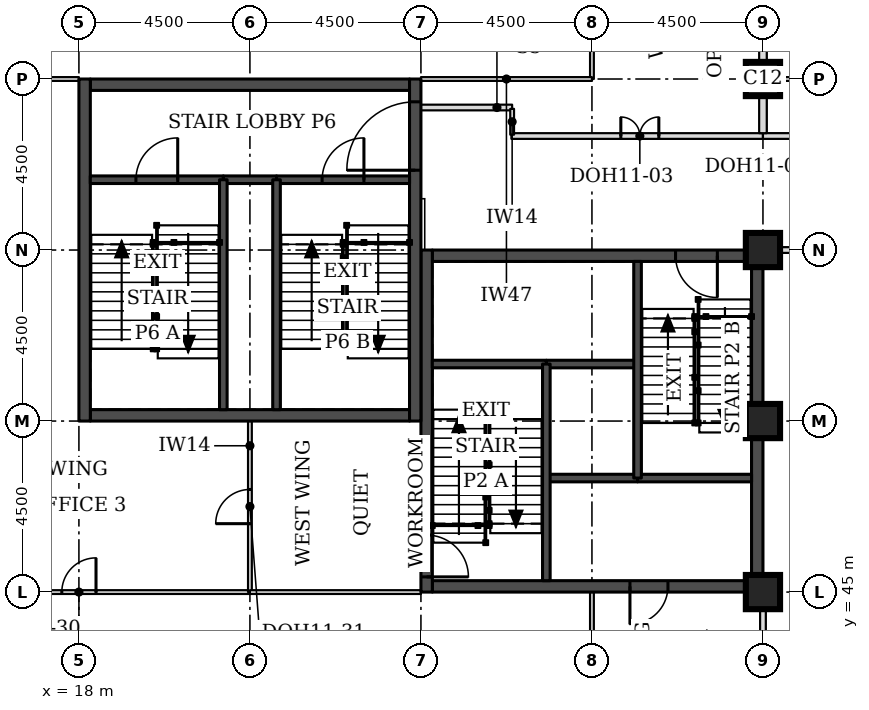
"""IFC4 building model, lengths in metres.
Left out: names, types, materials, properties, quantities, classifications, styles, units other than length and angle.
Written with IfcOpenShell. Run it as: python <this file> out.ifc"""

import sys

from ifc_helpers import new_model, si_unit, direction, frame, frame_2d, origin, origin_2d, place, context, subcontext, project, spatial, rectangle, extrude, element, fill, save


model = new_model("IFC4")
c1 = context("Model", 3, precision=1e-05, world=origin(), true_north=direction((0.0, 1.0)))
c2 = subcontext(c1, "Body", "Model", "MODEL_VIEW")
j1 = project(units=[si_unit("LENGTHUNIT", "METRE"), si_unit("PLANEANGLEUNIT", "RADIAN")], contexts=[c1])
p1 = place(None, origin())
s1 = spatial("IfcSite", under=j1, at=p1, CompositionType="ELEMENT")
p2 = place(p1, origin())
s2 = spatial("IfcBuilding", under=s1, at=p2, CompositionType="ELEMENT")
p3 = place(p2, frame((0.0, 0.0, 234.1)))
s3 = spatial("IfcBuildingStorey", under=s2, at=p3, CompositionType="ELEMENT", Elevation=234.1)
for number, where, z_axis, x_axis in (
    (1, (36.0, 45.0, 0.0), (0.0, 0.0, 1.0), (1.0, 0.0, 0.0)),
    (2, (36.0, 49.5, 0.0), (0.0, 0.0, 1.0), (1.0, 0.0, 0.0)),
    (3, (36.0, 54.0, 0.0), (0.0, 0.0, 1.0), (1.0, 0.0, 0.0)),
    (4, (36.0, 58.5, 0.0), (0.0, 0.0, 1.0), (1.0, 0.0, 0.0)),
):
    element("IfcColumn", number, at=place(p3, frame(where, z_axis=z_axis, x_axis=x_axis)), inside=s3, PredefinedType="COLUMN", context=c2, shape_type="SweptSolid", body=[
        extrude(rectangle(XDim=0.9, YDim=0.9, at=origin_2d()), origin(), (0.0, 0.0, 1.0), 3.7),
    ])
p4 = place(p3, frame((27.3, 45.15, 0.0), z_axis=(0.0, 0.0, 1.0), x_axis=(1.0, 0.0, 0.0)))
e5 = element("IfcWall", 5, at=p4, inside=s3, PredefinedType="SHEAR", context=c2, shape_type="SweptSolid", body=[
    extrude(rectangle(XDim=8.4, YDim=0.3, at=frame_2d((4.2, 0.0))), origin(), (0.0, 0.0, 1.0), 3.7),
])
p5 = place(p4, frame((5.2, 0.0, 0.0)))
e6 = element("IfcOpeningElement", 6, at=p5, cuts=e5, PredefinedType="OPENING", context=c2, shape_type="SweptSolid", body=[
    extrude(rectangle(XDim=1.0, YDim=2.1, at=frame_2d((0.5, 1.05))), frame((0.0, 0.16, 0.0), z_axis=(0.0, -1.0, 0.0), x_axis=(1.0, 0.0, 0.0)), (0.0, 0.0, 1.0), 0.32),
])
p6 = place(p3, frame((27.3, 53.85, 0.0), z_axis=(0.0, 0.0, 1.0), x_axis=(1.0, 0.0, 0.0)))
e7 = element("IfcWall", 7, at=p6, inside=s3, PredefinedType="SHEAR", context=c2, shape_type="SweptSolid", body=[
    extrude(rectangle(XDim=8.4, YDim=0.3, at=frame_2d((4.2, 0.0))), origin(), (0.0, 0.0, 1.0), 3.7),
])
p7 = place(p6, frame((6.4, 0.0, 0.0)))
e8 = element("IfcOpeningElement", 8, at=p7, cuts=e7, PredefinedType="OPENING", context=c2, shape_type="SweptSolid", body=[
    extrude(rectangle(XDim=1.1, YDim=2.1, at=frame_2d((0.55, 1.05))), frame((0.0, 0.16, 0.0), z_axis=(0.0, -1.0, 0.0), x_axis=(1.0, 0.0, 0.0)), (0.0, 0.0, 1.0), 0.32),
])
p8 = place(p3, frame((27.15, 45.0, 0.0), z_axis=(0.0, 0.0, 1.0), x_axis=(0.0, 1.0, 0.0)))
e9 = element("IfcWall", 9, at=p8, inside=s3, PredefinedType="SHEAR", context=c2, shape_type="SweptSolid", body=[
    extrude(rectangle(XDim=9.0, YDim=0.3, at=frame_2d((4.5, 0.0))), origin(), (0.0, 0.0, 1.0), 3.7),
])
p9 = place(p8, frame((0.4, 0.0, 0.0)))
e10 = element("IfcOpeningElement", 10, at=p9, cuts=e9, PredefinedType="OPENING", context=c2, shape_type="SweptSolid", body=[
    extrude(rectangle(XDim=1.1, YDim=2.1, at=frame_2d((0.55, 1.05))), frame((0.0, 0.16, 0.0), z_axis=(0.0, -1.0, 0.0), x_axis=(1.0, 0.0, 0.0)), (0.0, 0.0, 1.0), 0.32),
])
p10 = place(p3, frame((35.85, 45.0, 0.0), z_axis=(0.0, 0.0, 1.0), x_axis=(0.0, 1.0, 0.0)))
e11 = element("IfcWall", 11, at=p10, inside=s3, PredefinedType="SHEAR", context=c2, shape_type="SweptSolid", body=[
    extrude(rectangle(XDim=9.0, YDim=0.3, at=frame_2d((4.5, 0.0))), origin(), (0.0, 0.0, 1.0), 3.7),
])
for number, where, z_axis, x_axis in (
    (12, (18.3, 49.65, 0.0), (0.0, 0.0, 1.0), (1.0, 0.0, 0.0)),
    (13, (18.3, 58.35, 0.0), (0.0, 0.0, 1.0), (1.0, 0.0, 0.0)),
):
    element("IfcWall", number, at=place(p3, frame(where, z_axis=z_axis, x_axis=x_axis)), inside=s3, PredefinedType="SHEAR", context=c2, shape_type="SweptSolid", body=[
        extrude(rectangle(XDim=8.4, YDim=0.3, at=frame_2d((4.2, 0.0))), origin(), (0.0, 0.0, 1.0), 3.7),
    ])
p11 = place(p3, frame((18.15, 49.5, 0.0), z_axis=(0.0, 0.0, 1.0), x_axis=(0.0, 1.0, 0.0)))
e14 = element("IfcWall", 14, at=p11, inside=s3, PredefinedType="SHEAR", context=c2, shape_type="SweptSolid", body=[
    extrude(rectangle(XDim=9.0, YDim=0.3, at=frame_2d((4.5, 0.0))), origin(), (0.0, 0.0, 1.0), 3.7),
])
p12 = place(p3, frame((26.85, 49.5, 0.0), z_axis=(0.0, 0.0, 1.0), x_axis=(0.0, 1.0, 0.0)))
e15 = element("IfcWall", 15, at=p12, inside=s3, PredefinedType="SHEAR", context=c2, shape_type="SweptSolid", body=[
    extrude(rectangle(XDim=9.0, YDim=0.3, at=frame_2d((4.5, 0.0))), origin(), (0.0, 0.0, 1.0), 3.7),
])
p13 = place(p12, frame((6.6, 0.0, 0.0)))
e16 = element("IfcOpeningElement", 16, at=p13, cuts=e15, PredefinedType="OPENING", context=c2, shape_type="SweptSolid", body=[
    extrude(rectangle(XDim=1.8, YDim=2.1, at=frame_2d((0.9, 1.05))), frame((0.0, 0.16, 0.0), z_axis=(0.0, -1.0, 0.0), x_axis=(1.0, 0.0, 0.0)), (0.0, 0.0, 1.0), 0.32),
])
p14 = place(p3, frame((17.792, 63.676, 0.0), z_axis=(0.0, 0.0, 1.0), x_axis=(-0.707106781187, -0.707106781187, 0.0)))
e17 = element("IfcWall", 17, at=p14, inside=s3, PredefinedType="STANDARD", context=c2, shape_type="SweptSolid", body=[
    extrude(rectangle(XDim=7.027, YDim=0.35, at=frame_2d((3.513, 0.0))), origin(), (0.0, 0.0, 1.0), 3.525),
])
p15 = place(p14, frame((1.863, 0.0, 0.9)))
e18 = element("IfcOpeningElement", 18, at=p15, cuts=e17, PredefinedType="OPENING", context=c2, shape_type="SweptSolid", body=[
    extrude(rectangle(XDim=3.3, YDim=1.9, at=frame_2d((1.65, 0.95))), frame((0.0, 0.185, 0.0), z_axis=(0.0, -1.0, 0.0), x_axis=(1.0, 0.0, 0.0)), (0.0, 0.0, 1.0), 0.37),
])
p16 = place(p3, frame((12.824, 44.792, 0.0), z_axis=(0.0, 0.0, 1.0), x_axis=(0.707106781187, -0.707106781187, 0.0)))
e19 = element("IfcWall", 19, at=p16, inside=s3, PredefinedType="STANDARD", context=c2, shape_type="SweptSolid", body=[
    extrude(rectangle(XDim=7.027, YDim=0.35, at=frame_2d((3.513, 0.0))), origin(), (0.0, 0.0, 1.0), 3.525),
])
p17 = place(p16, frame((1.863, 0.0, 0.9)))
e20 = element("IfcOpeningElement", 20, at=p17, cuts=e19, PredefinedType="OPENING", context=c2, shape_type="SweptSolid", body=[
    extrude(rectangle(XDim=3.3, YDim=1.9, at=frame_2d((1.65, 0.95))), frame((0.0, 0.185, 0.0), z_axis=(0.0, -1.0, 0.0), x_axis=(1.0, 0.0, 0.0)), (0.0, 0.0, 1.0), 0.37),
])
p18 = place(p3, frame((36.45, 54.0, 0.0), z_axis=(0.0, 0.0, 1.0), x_axis=(1.0, 0.0, 0.0)))
e21 = element("IfcWall", 21, at=p18, inside=s3, PredefinedType="PARTITIONING", context=c2, shape_type="SweptSolid", body=[
    extrude(rectangle(XDim=5.625, YDim=0.15, at=frame_2d((2.812, 0.0))), origin(), (0.0, 0.0, 1.0), 3.55),
])
p19 = place(p3, frame((29.38, 57.0, 0.0), z_axis=(0.0, 0.0, 1.0), x_axis=(1.0, 0.0, 0.0)))
e22 = element("IfcWall", 22, at=p19, inside=s3, PredefinedType="PARTITIONING", context=c2, shape_type="SweptSolid", body=[
    extrude(rectangle(XDim=6.62, YDim=0.15, at=frame_2d((3.31, 0.0))), origin(), (0.0, 0.0, 1.0), 3.55),
])
p20 = place(p19, frame((2.88, 0.0, 0.0)))
e23 = element("IfcOpeningElement", 23, at=p20, cuts=e22, PredefinedType="OPENING", context=c2, shape_type="SweptSolid", body=[
    extrude(rectangle(XDim=1.0, YDim=2.1, at=frame_2d((0.5, 1.05))), frame((0.0, 0.085, 0.0), z_axis=(0.0, -1.0, 0.0), x_axis=(1.0, 0.0, 0.0)), (0.0, 0.0, 1.0), 0.17),
])
p21 = place(p3, frame((36.0, 57.0, 0.0), z_axis=(0.0, 0.0, 1.0), x_axis=(1.0, 0.0, 0.0)))
e24 = element("IfcWall", 24, at=p21, inside=s3, PredefinedType="PARTITIONING", context=c2, shape_type="SweptSolid", body=[
    extrude(rectangle(XDim=6.075, YDim=0.15, at=frame_2d((3.038, 0.0))), origin(), (0.0, 0.0, 1.0), 3.55),
])
p22 = place(p21, frame((2.55, 0.0, 0.0)))
e25 = element("IfcOpeningElement", 25, at=p22, cuts=e24, PredefinedType="OPENING", context=c2, shape_type="SweptSolid", body=[
    extrude(rectangle(XDim=1.0, YDim=2.1, at=frame_2d((0.5, 1.05))), frame((0.0, 0.085, 0.0), z_axis=(0.0, -1.0, 0.0), x_axis=(1.0, 0.0, 0.0)), (0.0, 0.0, 1.0), 0.17),
])
p23 = place(p3, frame((36.45, 58.5, 0.0), z_axis=(0.0, 0.0, 1.0), x_axis=(1.0, 0.0, 0.0)))
e26 = element("IfcWall", 26, at=p23, inside=s3, PredefinedType="PARTITIONING", context=c2, shape_type="SweptSolid", body=[
    extrude(rectangle(XDim=2.6, YDim=0.1, at=frame_2d((1.3, 0.0))), origin(), (0.0, 0.0, 1.0), 3.55),
])
p24 = place(p23, frame((0.85, 0.0, 0.0)))
e27 = element("IfcOpeningElement", 27, at=p24, cuts=e26, PredefinedType="OPENING", context=c2, shape_type="SweptSolid", body=[
    extrude(rectangle(XDim=0.9, YDim=2.1, at=frame_2d((0.45, 1.05))), frame((0.0, 0.06, 0.0), z_axis=(0.0, -1.0, 0.0), x_axis=(1.0, 0.0, 0.0)), (0.0, 0.0, 1.0), 0.12),
])
p25 = place(p3, frame((36.0, 40.95, 0.0), z_axis=(0.0, 0.0, 1.0), x_axis=(0.0, 1.0, 0.0)))
e28 = element("IfcWall", 28, at=p25, inside=s3, PredefinedType="PARTITIONING", context=c2, shape_type="SweptSolid", body=[
    extrude(rectangle(XDim=3.63, YDim=0.15, at=frame_2d((1.815, 0.0))), origin(), (0.0, 0.0, 1.0), 2.8),
])
p26 = place(p25, frame((1.4, 0.0, 0.0)))
e29 = element("IfcOpeningElement", 29, at=p26, cuts=e28, PredefinedType="OPENING", context=c2, shape_type="SweptSolid", body=[
    extrude(rectangle(XDim=0.9, YDim=2.1, at=frame_2d((0.45, 1.05))), frame((0.0, 0.085, 0.0), z_axis=(0.0, -1.0, 0.0), x_axis=(1.0, 0.0, 0.0)), (0.0, 0.0, 1.0), 0.17),
])
p27 = place(p3, frame((36.0, 57.075, 0.0), z_axis=(0.0, 0.0, 1.0), x_axis=(0.0, 1.0, 0.0)))
e30 = element("IfcWall", 30, at=p27, inside=s3, PredefinedType="PARTITIONING", context=c2, shape_type="SweptSolid", body=[
    extrude(rectangle(XDim=0.975, YDim=0.2, at=frame_2d((0.488, 0.0))), origin(), (0.0, 0.0, 1.0), 2.8),
])
p28 = place(p3, frame((36.0, 58.92, 0.0), z_axis=(0.0, 0.0, 1.0), x_axis=(0.0, 1.0, 0.0)))
e31 = element("IfcWall", 31, at=p28, inside=s3, PredefinedType="PARTITIONING", context=c2, shape_type="SweptSolid", body=[
    extrude(rectangle(XDim=3.63, YDim=0.2, at=frame_2d((1.815, 0.0))), origin(), (0.0, 0.0, 1.0), 2.8),
])
p29 = place(p3, frame((31.5, 63.0, 0.0), z_axis=(0.0, 0.0, 1.0), x_axis=(0.0, -1.0, 0.0)))
e32 = element("IfcWall", 32, at=p29, inside=s3, PredefinedType="PARTITIONING", context=c2, shape_type="SweptSolid", body=[
    extrude(rectangle(XDim=4.5, YDim=0.1, at=frame_2d((2.25, 0.0))), origin(), (0.0, 0.0, 1.0), 3.55),
])
p30 = place(p29, frame((1.8, 0.0, 0.0)))
e33 = element("IfcOpeningElement", 33, at=p30, cuts=e32, PredefinedType="OPENING", context=c2, shape_type="SweptSolid", body=[
    extrude(rectangle(XDim=0.9, YDim=2.1, at=frame_2d((0.45, 1.05))), frame((0.0, 0.06, 0.0), z_axis=(0.0, -1.0, 0.0), x_axis=(1.0, 0.0, 0.0)), (0.0, 0.0, 1.0), 0.12),
])
p31 = place(p3, frame((31.5, 58.5, 0.0), z_axis=(0.0, 0.0, 1.0), x_axis=(-1.0, 0.0, 0.0)))
e34 = element("IfcWall", 34, at=p31, inside=s3, PredefinedType="PARTITIONING", context=c2, shape_type="SweptSolid", body=[
    extrude(rectangle(XDim=4.5, YDim=0.1, at=frame_2d((2.25, 0.0))), origin(), (0.0, 0.0, 1.0), 2.55),
])
p32 = place(p3, frame((13.5, 58.5, 0.0), z_axis=(0.0, 0.0, 1.0), x_axis=(1.0, 0.0, 0.0)))
e35 = element("IfcWall", 35, at=p32, inside=s3, PredefinedType="PARTITIONING", context=c2, shape_type="SweptSolid", body=[
    extrude(rectangle(XDim=4.5, YDim=0.1, at=frame_2d((2.25, 0.0))), origin(), (0.0, 0.0, 1.0), 2.55),
])
p33 = place(p32, frame((1.8, 0.0, 0.0)))
e36 = element("IfcOpeningElement", 36, at=p33, cuts=e35, PredefinedType="OPENING", context=c2, shape_type="SweptSolid", body=[
    extrude(rectangle(XDim=0.9, YDim=2.1, at=frame_2d((0.45, 1.05))), frame((0.0, 0.06, 0.0), z_axis=(0.0, -1.0, 0.0), x_axis=(1.0, 0.0, 0.0)), (0.0, 0.0, 1.0), 0.12),
])
p34 = place(p3, frame((22.5, 45.0, 0.0), z_axis=(0.0, 0.0, 1.0), x_axis=(-1.0, 0.0, 0.0)))
e37 = element("IfcWall", 37, at=p34, inside=s3, PredefinedType="PARTITIONING", context=c2, shape_type="SweptSolid", body=[
    extrude(rectangle(XDim=9.0, YDim=0.1, at=frame_2d((4.5, 0.0))), origin(), (0.0, 0.0, 1.0), 2.55),
])
p35 = place(p34, frame((4.05, 0.0, 0.0)))
e38 = element("IfcOpeningElement", 38, at=p35, cuts=e37, PredefinedType="OPENING", context=c2, shape_type="SweptSolid", body=[
    extrude(rectangle(XDim=0.9, YDim=2.1, at=frame_2d((0.45, 1.05))), frame((0.0, 0.06, 0.0), z_axis=(0.0, -1.0, 0.0), x_axis=(1.0, 0.0, 0.0)), (0.0, 0.0, 1.0), 0.12),
])
p36 = place(p3, frame((22.5, 49.5, 0.0), z_axis=(0.0, 0.0, 1.0), x_axis=(0.0, -1.0, 0.0)))
e39 = element("IfcWall", 39, at=p36, inside=s3, PredefinedType="PARTITIONING", context=c2, shape_type="SweptSolid", body=[
    extrude(rectangle(XDim=4.5, YDim=0.1, at=frame_2d((2.25, 0.0))), origin(), (0.0, 0.0, 1.0), 3.55),
])
p37 = place(p36, frame((1.8, 0.0, 0.0)))
e40 = element("IfcOpeningElement", 40, at=p37, cuts=e39, PredefinedType="OPENING", context=c2, shape_type="SweptSolid", body=[
    extrude(rectangle(XDim=0.9, YDim=2.1, at=frame_2d((0.45, 1.05))), frame((0.0, 0.06, 0.0), z_axis=(0.0, -1.0, 0.0), x_axis=(1.0, 0.0, 0.0)), (0.0, 0.0, 1.0), 0.12),
])
p38 = place(p3, frame((22.5, 45.0, 0.0), z_axis=(0.0, 0.0, 1.0), x_axis=(1.0, 0.0, 0.0)))
e41 = element("IfcWall", 41, at=p38, inside=s3, PredefinedType="PARTITIONING", context=c2, shape_type="SweptSolid", body=[
    extrude(rectangle(XDim=4.5, YDim=0.1, at=frame_2d((2.25, 0.0))), origin(), (0.0, 0.0, 1.0), 2.55),
])
p39 = place(p3, frame((31.5, 45.0, 0.0), z_axis=(0.0, 0.0, 1.0), x_axis=(0.0, -1.0, 0.0)))
e42 = element("IfcWall", 42, at=p39, inside=s3, PredefinedType="PARTITIONING", context=c2, shape_type="SweptSolid", body=[
    extrude(rectangle(XDim=4.5, YDim=0.1, at=frame_2d((2.25, 0.0))), origin(), (0.0, 0.0, 1.0), 3.55),
])
p40 = place(p39, frame((1.8, 0.0, 0.0)))
e43 = element("IfcOpeningElement", 43, at=p40, cuts=e42, PredefinedType="OPENING", context=c2, shape_type="SweptSolid", body=[
    extrude(rectangle(XDim=0.9, YDim=2.1, at=frame_2d((0.45, 1.05))), frame((0.0, 0.06, 0.0), z_axis=(0.0, -1.0, 0.0), x_axis=(1.0, 0.0, 0.0)), (0.0, 0.0, 1.0), 0.12),
])
p41 = place(p3, frame((27.0, 57.75, 0.0), z_axis=(0.0, 0.0, 1.0), x_axis=(1.0, 0.0, 0.0)))
e44 = element("IfcWall", 44, at=p41, inside=s3, PredefinedType="PARTITIONING", context=c2, shape_type="SweptSolid", body=[
    extrude(rectangle(XDim=2.4, YDim=0.15, at=frame_2d((1.2, 0.0))), origin(), (0.0, 0.0, 1.0), 3.55),
])
p42 = place(p3, frame((29.4, 57.715, 0.0), z_axis=(0.0, 0.0, 1.0), x_axis=(0.0, -1.0, 0.0)))
e45 = element("IfcWall", 45, at=p42, inside=s3, PredefinedType="PARTITIONING", context=c2, shape_type="SweptSolid", body=[
    extrude(rectangle(XDim=0.68, YDim=0.1, at=frame_2d((0.34, 0.0))), origin(), (0.0, 0.0, 1.0), 3.55),
])
p43 = place(p3, frame((30.3, 48.0, 0.0), z_axis=(0.0, 0.0, 1.0), x_axis=(1.0, 0.0, 0.0)))
e46 = element("IfcWall", 46, at=p43, inside=s3, PredefinedType="SOLIDWALL", context=c2, shape_type="SweptSolid", body=[
    extrude(rectangle(XDim=2.4, YDim=0.2, at=frame_2d((1.2, 0.0))), origin(), (0.0, 0.0, 1.0), 3.55),
])
p44 = place(p3, frame((32.7, 48.0, 0.0), z_axis=(0.0, 0.0, 1.0), x_axis=(1.0, 0.0, 0.0)))
e47 = element("IfcWall", 47, at=p44, inside=s3, PredefinedType="SOLIDWALL", context=c2, shape_type="SweptSolid", body=[
    extrude(rectangle(XDim=3.0, YDim=0.2, at=frame_2d((1.5, 0.0))), origin(), (0.0, 0.0, 1.0), 3.55),
])
p45 = place(p3, frame((30.3, 51.0, 0.0), z_axis=(0.0, 0.0, 1.0), x_axis=(1.0, 0.0, 0.0)))
e48 = element("IfcWall", 48, at=p45, inside=s3, PredefinedType="SOLIDWALL", context=c2, shape_type="SweptSolid", body=[
    extrude(rectangle(XDim=2.4, YDim=0.2, at=frame_2d((1.2, 0.0))), origin(), (0.0, 0.0, 1.0), 3.7),
])
p46 = place(p3, frame((27.3, 51.0, 0.0), z_axis=(0.0, 0.0, 1.0), x_axis=(1.0, 0.0, 0.0)))
e49 = element("IfcWall", 49, at=p46, inside=s3, PredefinedType="SOLIDWALL", context=c2, shape_type="SweptSolid", body=[
    extrude(rectangle(XDim=3.0, YDim=0.2, at=frame_2d((1.5, 0.0))), origin(), (0.0, 0.0, 1.0), 3.55),
])
for number, where, z_axis, x_axis in (
    (50, (30.3, 45.3, 0.0), (0.0, 0.0, 1.0), (0.0, 1.0, 0.0)),
    (51, (32.7, 48.0, 0.0), (0.0, 0.0, 1.0), (0.0, 1.0, 0.0)),
):
    element("IfcWall", number, at=place(p3, frame(where, z_axis=z_axis, x_axis=x_axis)), inside=s3, PredefinedType="SOLIDWALL", context=c2, shape_type="SweptSolid", body=[
        extrude(rectangle(XDim=5.7, YDim=0.2, at=frame_2d((2.85, 0.0))), origin(), (0.0, 0.0, 1.0), 3.55),
    ])
p47 = place(p3, frame((21.8, 55.85, 0.0), z_axis=(0.0, 0.0, 1.0), x_axis=(1.0, 0.0, 0.0)))
e52 = element("IfcWall", 52, at=p47, inside=s3, PredefinedType="SOLIDWALL", context=c2, shape_type="SweptSolid", body=[
    extrude(rectangle(XDim=1.4, YDim=0.2, at=frame_2d((0.7, 0.0))), origin(), (0.0, 0.0, 1.0), 3.55),
])
p48 = place(p3, frame((18.3, 55.85, 0.0), z_axis=(0.0, 0.0, 1.0), x_axis=(1.0, 0.0, 0.0)))
e53 = element("IfcWall", 53, at=p48, inside=s3, PredefinedType="SOLIDWALL", context=c2, shape_type="SweptSolid", body=[
    extrude(rectangle(XDim=3.5, YDim=0.2, at=frame_2d((1.75, 0.0))), origin(), (0.0, 0.0, 1.0), 3.55),
])
p49 = place(p48, frame((1.2, 0.0, 0.0)))
e54 = element("IfcOpeningElement", 54, at=p49, cuts=e53, PredefinedType="OPENING", context=c2, shape_type="SweptSolid", body=[
    extrude(rectangle(XDim=1.1, YDim=2.1, at=frame_2d((0.55, 1.05))), frame((0.0, 0.11, 0.0), z_axis=(0.0, -1.0, 0.0), x_axis=(1.0, 0.0, 0.0)), (0.0, 0.0, 1.0), 0.22),
])
p50 = place(p3, frame((23.2, 55.85, 0.0), z_axis=(0.0, 0.0, 1.0), x_axis=(1.0, 0.0, 0.0)))
e55 = element("IfcWall", 55, at=p50, inside=s3, PredefinedType="SOLIDWALL", context=c2, shape_type="SweptSolid", body=[
    extrude(rectangle(XDim=3.5, YDim=0.2, at=frame_2d((1.75, 0.0))), origin(), (0.0, 0.0, 1.0), 3.55),
])
p51 = place(p50, frame((1.2, 0.0, 0.0)))
e56 = element("IfcOpeningElement", 56, at=p51, cuts=e55, PredefinedType="OPENING", context=c2, shape_type="SweptSolid", body=[
    extrude(rectangle(XDim=1.1, YDim=2.1, at=frame_2d((0.55, 1.05))), frame((0.0, 0.11, 0.0), z_axis=(0.0, -1.0, 0.0), x_axis=(1.0, 0.0, 0.0)), (0.0, 0.0, 1.0), 0.22),
])
for number, where, z_axis, x_axis in (
    (57, (21.8, 49.8, 0.0), (0.0, 0.0, 1.0), (0.0, 1.0, 0.0)),
    (58, (23.2, 49.8, 0.0), (0.0, 0.0, 1.0), (0.0, 1.0, 0.0)),
):
    element("IfcWall", number, at=place(p3, frame(where, z_axis=z_axis, x_axis=x_axis)), inside=s3, PredefinedType="SOLIDWALL", context=c2, shape_type="SweptSolid", body=[
        extrude(rectangle(XDim=6.05, YDim=0.2, at=frame_2d((3.025, 0.0))), origin(), (0.0, 0.0, 1.0), 3.55),
    ])
p52 = place(p20, origin())
e59 = element("IfcDoor", 59, at=p52, inside=s3, OperationType="DOUBLE_DOOR_SINGLE_SWING", PredefinedType="DOOR", context=c2, shape_type="SweptSolid", body=[
    extrude(rectangle(XDim=1.0, YDim=2.1, at=frame_2d((0.5, 1.05))), frame((0.0, 0.025, 0.0), z_axis=(0.0, -1.0, 0.0), x_axis=(1.0, 0.0, 0.0)), (0.0, 0.0, 1.0), 0.05),
])
fill(e23, e59)
p53 = place(p35, frame((0.9, 0.0, 0.0), z_axis=(0.0, 0.0, 1.0), x_axis=(-1.0, 0.0, 0.0)))
e60 = element("IfcDoor", 60, at=p53, inside=s3, OperationType="SINGLE_SWING_RIGHT", PredefinedType="DOOR", context=c2, shape_type="SweptSolid", body=[
    extrude(rectangle(XDim=0.9, YDim=2.1, at=frame_2d((0.45, 1.05))), frame((0.0, 0.025, 0.0), z_axis=(0.0, -1.0, 0.0), x_axis=(1.0, 0.0, 0.0)), (0.0, 0.0, 1.0), 0.05),
])
fill(e38, e60)
p54 = place(p37, frame((0.9, 0.0, 0.0), z_axis=(0.0, 0.0, 1.0), x_axis=(-1.0, 0.0, 0.0)))
e61 = element("IfcDoor", 61, at=p54, inside=s3, OperationType="SINGLE_SWING_LEFT", PredefinedType="DOOR", context=c2, shape_type="SweptSolid", body=[
    extrude(rectangle(XDim=0.9, YDim=2.1, at=frame_2d((0.45, 1.05))), frame((0.0, 0.025, 0.0), z_axis=(0.0, -1.0, 0.0), x_axis=(1.0, 0.0, 0.0)), (0.0, 0.0, 1.0), 0.05),
])
fill(e40, e61)
p55 = place(p9, frame((1.1, 0.0, 0.0), z_axis=(0.0, 0.0, 1.0), x_axis=(-1.0, 0.0, 0.0)))
e62 = element("IfcDoor", 62, at=p55, inside=s3, OperationType="SINGLE_SWING_RIGHT", PredefinedType="DOOR", context=c2, shape_type="SweptSolid", body=[
    extrude(rectangle(XDim=1.1, YDim=2.1, at=frame_2d((0.55, 1.05))), frame((0.0, 0.025, 0.0), z_axis=(0.0, -1.0, 0.0), x_axis=(1.0, 0.0, 0.0)), (0.0, 0.0, 1.0), 0.05),
])
fill(e10, e62)
p56 = place(p7, frame((1.1, 0.0, 0.0), z_axis=(0.0, 0.0, 1.0), x_axis=(-1.0, 0.0, 0.0)))
e63 = element("IfcDoor", 63, at=p56, inside=s3, OperationType="SINGLE_SWING_LEFT", PredefinedType="DOOR", context=c2, shape_type="SweptSolid", body=[
    extrude(rectangle(XDim=1.1, YDim=2.1, at=frame_2d((0.55, 1.05))), frame((0.0, 0.025, 0.0), z_axis=(0.0, -1.0, 0.0), x_axis=(1.0, 0.0, 0.0)), (0.0, 0.0, 1.0), 0.05),
])
fill(e8, e63)
p57 = place(p5, frame((1.0, 0.0, 0.0), z_axis=(0.0, 0.0, 1.0), x_axis=(-1.0, 0.0, 0.0)))
e64 = element("IfcDoor", 64, at=p57, inside=s3, OperationType="SINGLE_SWING_RIGHT", PredefinedType="DOOR", context=c2, shape_type="SweptSolid", body=[
    extrude(rectangle(XDim=1.0, YDim=2.1, at=frame_2d((0.5, 1.05))), frame((0.0, 0.025, 0.0), z_axis=(0.0, -1.0, 0.0), x_axis=(1.0, 0.0, 0.0)), (0.0, 0.0, 1.0), 0.05),
])
fill(e6, e64)
p58 = place(p49, origin())
e65 = element("IfcDoor", 65, at=p58, inside=s3, OperationType="SINGLE_SWING_RIGHT", PredefinedType="DOOR", context=c2, shape_type="SweptSolid", body=[
    extrude(rectangle(XDim=1.1, YDim=2.1, at=frame_2d((0.55, 1.05))), frame((0.0, 0.025, 0.0), z_axis=(0.0, -1.0, 0.0), x_axis=(1.0, 0.0, 0.0)), (0.0, 0.0, 1.0), 0.05),
])
fill(e54, e65)
p59 = place(p51, origin())
e66 = element("IfcDoor", 66, at=p59, inside=s3, OperationType="SINGLE_SWING_RIGHT", PredefinedType="DOOR", context=c2, shape_type="SweptSolid", body=[
    extrude(rectangle(XDim=1.1, YDim=2.1, at=frame_2d((0.55, 1.05))), frame((0.0, 0.025, 0.0), z_axis=(0.0, -1.0, 0.0), x_axis=(1.0, 0.0, 0.0)), (0.0, 0.0, 1.0), 0.05),
])
fill(e56, e66)
p60 = place(p13, origin())
e67 = element("IfcDoor", 67, at=p60, inside=s3, OperationType="SINGLE_SWING_LEFT", PredefinedType="DOOR", context=c2, shape_type="SweptSolid", body=[
    extrude(rectangle(XDim=1.8, YDim=2.1, at=frame_2d((0.9, 1.05))), frame((0.0, 0.025, 0.0), z_axis=(0.0, -1.0, 0.0), x_axis=(1.0, 0.0, 0.0)), (0.0, 0.0, 1.0), 0.05),
])
fill(e16, e67)
save(model, sys.argv[1])
